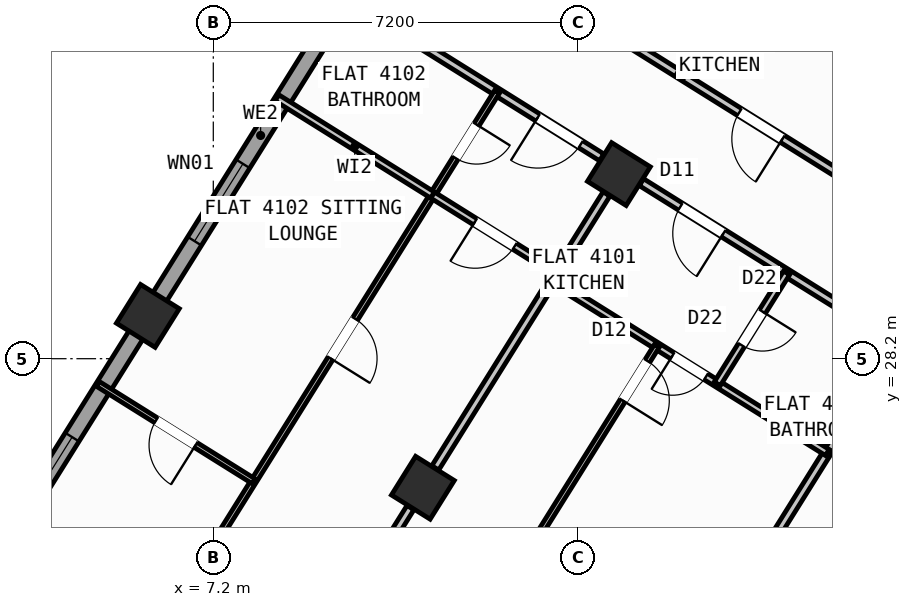
"""IFC4 building model, lengths in metres.
Left out: names, types, materials, properties, quantities, classifications, styles, units other than length and angle.
Written with IfcOpenShell. Run it as: python <this file> out.ifc"""

import sys

from ifc_helpers import new_model, si_unit, direction, frame, frame_2d, origin, origin_2d, place, context, subcontext, project, spatial, rectangle, hollow_rectangle, extrude, source, transform, mapped, element, fill, save


model = new_model("IFC4")
c1 = context("Model", 3, precision=1e-05, world=origin(), true_north=direction((0.0, 1.0)))
c2 = subcontext(c1, "Body", "Model", "MODEL_VIEW")
j1 = project(units=[si_unit("LENGTHUNIT", "METRE"), si_unit("PLANEANGLEUNIT", "RADIAN")], contexts=[c1])
p1 = place(None, origin())
s1 = spatial("IfcSite", under=j1, at=p1, CompositionType="ELEMENT")
p2 = place(p1, origin())
s2 = spatial("IfcBuilding", under=s1, at=p2, CompositionType="ELEMENT")
p3 = place(p2, frame((0.0, 0.0, 162.3)))
s3 = spatial("IfcBuildingStorey", under=s2, at=p3, CompositionType="ELEMENT", Elevation=162.3)
m1 = source(origin(), c2, "Body", "SweptSolid", [
    extrude(hollow_rectangle(XDim=0.9, YDim=0.9, WallThickness=0.036, at=origin_2d()), origin(), (0.0, 0.0, 1.0), 3.6),
])
for number, where, z_axis, x_axis in (
    (1, (15.205, 31.844, 0.0), (0.0, 0.0, 1.0), (-0.848, 0.53, 0.0)),
    (2, (11.336, 25.653, 0.0), (0.0, 0.0, 1.0), (-0.848, 0.53, 0.0)),
    (3, (5.909, 29.044, 0.0), (0.0, 0.0, 1.0), (-0.848, 0.53, 0.0)),
):
    element("IfcColumn", number, at=place(p3, frame(where, z_axis=z_axis, x_axis=x_axis)), inside=s3, PredefinedType="COLUMN", context=c2, shape_type="MappedRepresentation", body=[
        mapped(m1, transform((0.0, 0.0, 0.0), scale=1.0)),
    ])
p4 = place(p3, frame((2.415, 23.452, 0.0), z_axis=(0.0, 0.0, 1.0), x_axis=(0.52991049553, 0.848053575387, 0.0)))
e4 = element("IfcWall", 4, at=p4, inside=s3, PredefinedType="STANDARD", context=c2, shape_type="SweptSolid", body=[
    extrude(rectangle(XDim=21.587, YDim=0.32, at=frame_2d((10.794, 0.0))), origin(), (0.0, 0.0, 1.0), 2.775),
])
p5 = place(p4, frame((1.673, 0.0, 0.8)))
e5 = element("IfcOpeningElement", 5, at=p5, cuts=e4, PredefinedType="OPENING", context=c2, shape_type="SweptSolid", body=[
    extrude(rectangle(XDim=2.1, YDim=1.55, at=frame_2d((1.05, 0.775))), frame((0.0, 0.17, 0.0), z_axis=(0.0, -1.0, 0.0), x_axis=(1.0, 0.0, 0.0)), (0.0, 0.0, 1.0), 0.34),
])
p6 = place(p4, frame((8.334, 0.0, 0.85)))
e6 = element("IfcOpeningElement", 6, at=p6, cuts=e4, PredefinedType="OPENING", context=c2, shape_type="SweptSolid", body=[
    extrude(rectangle(XDim=1.8, YDim=1.5, at=frame_2d((0.9, 0.75))), frame((0.0, 0.17, 0.0), z_axis=(0.0, -1.0, 0.0), x_axis=(1.0, 0.0, 0.0)), (0.0, 0.0, 1.0), 0.34),
])
p7 = place(p4, frame((17.172, 0.0, 0.85)))
e7 = element("IfcOpeningElement", 7, at=p7, cuts=e4, PredefinedType="OPENING", context=c2, shape_type="SweptSolid", body=[
    extrude(rectangle(XDim=1.5, YDim=1.5, at=frame_2d((0.75, 0.75))), frame((0.0, 0.17, 0.0), z_axis=(0.0, -1.0, 0.0), x_axis=(1.0, 0.0, 0.0)), (0.0, 0.0, 1.0), 0.34),
])
p8 = place(p3, frame((14.138, 41.825, 0.0), z_axis=(0.0, 0.0, 1.0), x_axis=(0.848046498049, -0.529921821731, 0.0)))
e8 = element("IfcWall", 8, at=p8, inside=s3, PredefinedType="STANDARD", context=c2, shape_type="SweptSolid", body=[
    extrude(rectangle(XDim=31.588, YDim=0.32, at=frame_2d((15.794, 0.0))), origin(), (0.0, 0.0, 1.0), 3.35),
])
p9 = place(p8, frame((3.253, 0.0, 0.0)))
e9 = element("IfcOpeningElement", 9, at=p9, cuts=e8, PredefinedType="OPENING", context=c2, shape_type="SweptSolid", body=[
    extrude(rectangle(XDim=1.05, YDim=2.15, at=frame_2d((0.525, 1.075))), frame((0.0, 0.17, 0.0), z_axis=(0.0, -1.0, 0.0), x_axis=(1.0, 0.0, 0.0)), (0.0, 0.0, 1.0), 0.34),
])
p10 = place(p8, frame((0.863, 0.0, 0.85)))
e10 = element("IfcOpeningElement", 10, at=p10, cuts=e8, PredefinedType="OPENING", context=c2, shape_type="SweptSolid", body=[
    extrude(rectangle(XDim=1.8, YDim=1.5, at=frame_2d((0.9, 0.75))), frame((0.0, 0.17, 0.0), z_axis=(0.0, -1.0, 0.0), x_axis=(1.0, 0.0, 0.0)), (0.0, 0.0, 1.0), 0.34),
])
p11 = place(p8, frame((8.494, 0.0, 0.85)))
e11 = element("IfcOpeningElement", 11, at=p11, cuts=e8, PredefinedType="OPENING", context=c2, shape_type="SweptSolid", body=[
    extrude(rectangle(XDim=1.8, YDim=1.5, at=frame_2d((0.9, 0.75))), frame((0.0, 0.17, 0.0), z_axis=(0.0, -1.0, 0.0), x_axis=(1.0, 0.0, 0.0)), (0.0, 0.0, 1.0), 0.34),
])
p12 = place(p8, frame((13.874, 0.0, 0.85)))
e12 = element("IfcOpeningElement", 12, at=p12, cuts=e8, PredefinedType="OPENING", context=c2, shape_type="SweptSolid", body=[
    extrude(rectangle(XDim=1.5, YDim=1.5, at=frame_2d((0.75, 0.75))), frame((0.0, 0.17, 0.0), z_axis=(0.0, -1.0, 0.0), x_axis=(1.0, 0.0, 0.0)), (0.0, 0.0, 1.0), 0.34),
])
p13 = place(p8, frame((17.104, 0.0, 1.0)))
e13 = element("IfcOpeningElement", 13, at=p13, cuts=e8, PredefinedType="OPENING", context=c2, shape_type="SweptSolid", body=[
    extrude(rectangle(XDim=0.9, YDim=1.25, at=frame_2d((0.45, 0.625))), frame((0.0, 0.17, 0.0), z_axis=(0.0, -1.0, 0.0), x_axis=(1.0, 0.0, 0.0)), (0.0, 0.0, 1.0), 0.34),
])
p14 = place(p8, frame((22.144, 0.0, 1.0)))
e14 = element("IfcOpeningElement", 14, at=p14, cuts=e8, PredefinedType="OPENING", context=c2, shape_type="SweptSolid", body=[
    extrude(rectangle(XDim=0.9, YDim=1.25, at=frame_2d((0.45, 0.625))), frame((0.0, 0.17, 0.0), z_axis=(0.0, -1.0, 0.0), x_axis=(1.0, 0.0, 0.0)), (0.0, 0.0, 1.0), 0.34),
])
p15 = place(p8, frame((27.744, 0.0, 1.0)))
e15 = element("IfcOpeningElement", 15, at=p15, cuts=e8, PredefinedType="OPENING", context=c2, shape_type="SweptSolid", body=[
    extrude(rectangle(XDim=0.9, YDim=1.25, at=frame_2d((0.45, 0.625))), frame((0.0, 0.17, 0.0), z_axis=(0.0, -1.0, 0.0), x_axis=(1.0, 0.0, 0.0)), (0.0, 0.0, 1.0), 0.34),
])
p16 = place(p3, frame((23.899, 26.529, 0.0), z_axis=(0.0, 0.0, 1.0), x_axis=(-0.529917716469, -0.848049063305, 0.0)))
e16 = element("IfcWall", 16, at=p16, inside=s3, PredefinedType="PARTITIONING", context=c2, shape_type="SweptSolid", body=[
    extrude(rectangle(XDim=14.05, YDim=0.16, at=frame_2d((7.025, 0.0))), origin(), (0.0, 0.0, 1.0), 3.34),
])
p17 = place(p3, frame((25.065, 28.394, 0.0), z_axis=(0.0, 0.0, 1.0), x_axis=(-0.848048310262, 0.529918921593, 0.0)))
e17 = element("IfcWall", 17, at=p17, inside=s3, PredefinedType="PARTITIONING", context=c2, shape_type="SweptSolid", body=[
    extrude(rectangle(XDim=16.73, YDim=0.16, at=frame_2d((8.365, 0.0))), origin(), (0.0, 0.0, 1.0), 3.34),
])
p18 = place(p17, frame((2.22, 0.0, 0.0)))
e18 = element("IfcOpeningElement", 18, at=p18, cuts=e17, PredefinedType="OPENING", context=c2, shape_type="SweptSolid", body=[
    extrude(rectangle(XDim=0.86, YDim=2.05, at=frame_2d((0.43, 1.025))), frame((0.0, 0.09, 0.0), z_axis=(0.0, -1.0, 0.0), x_axis=(1.0, 0.0, 0.0)), (0.0, 0.0, 1.0), 0.18),
])
p19 = place(p17, frame((7.82, 0.0, 0.0)))
e19 = element("IfcOpeningElement", 19, at=p19, cuts=e17, PredefinedType="OPENING", context=c2, shape_type="SweptSolid", body=[
    extrude(rectangle(XDim=1.0, YDim=2.1, at=frame_2d((0.5, 1.05))), frame((0.0, 0.09, 0.0), z_axis=(0.0, -1.0, 0.0), x_axis=(1.0, 0.0, 0.0)), (0.0, 0.0, 1.0), 0.18),
])
p20 = place(p17, frame((12.95, 0.0, 0.0)))
e20 = element("IfcOpeningElement", 20, at=p20, cuts=e17, PredefinedType="OPENING", context=c2, shape_type="SweptSolid", body=[
    extrude(rectangle(XDim=1.0, YDim=2.1, at=frame_2d((0.5, 1.05))), frame((0.0, 0.09, 0.0), z_axis=(0.0, -1.0, 0.0), x_axis=(1.0, 0.0, 0.0)), (0.0, 0.0, 1.0), 0.18),
])
p21 = place(p3, frame((20.293, 28.782, 0.0), z_axis=(0.0, 0.0, 1.0), x_axis=(-0.848040881926, 0.529930809241, 0.0)))
e21 = element("IfcWall", 21, at=p21, inside=s3, PredefinedType="PARTITIONING", context=c2, shape_type="SweptSolid", body=[
    extrude(rectangle(XDim=5.476, YDim=0.16, at=frame_2d((2.738, 0.0))), origin(), (0.0, 0.0, 1.0), 2.775),
])
p22 = place(p21, frame((3.568, 0.0, 0.0)))
e22 = element("IfcOpeningElement", 22, at=p22, cuts=e21, PredefinedType="OPENING", context=c2, shape_type="SweptSolid", body=[
    extrude(rectangle(XDim=1.0, YDim=2.1, at=frame_2d((0.5, 1.05))), frame((0.0, 0.09, 0.0), z_axis=(0.0, -1.0, 0.0), x_axis=(1.0, 0.0, 0.0)), (0.0, 0.0, 1.0), 0.18),
])
p23 = place(p3, frame((14.866, 32.173, 0.0), z_axis=(0.0, 0.0, 1.0), x_axis=(-0.848053401719, 0.529910773464, 0.0)))
e23 = element("IfcWall", 23, at=p23, inside=s3, PredefinedType="PARTITIONING", context=c2, shape_type="SweptSolid", body=[
    extrude(rectangle(XDim=5.476, YDim=0.16, at=frame_2d((2.738, 0.0))), origin(), (0.0, 0.0, 1.0), 2.775),
])
p24 = place(p23, frame((0.488, 0.0, 0.0)))
e24 = element("IfcOpeningElement", 24, at=p24, cuts=e23, PredefinedType="OPENING", context=c2, shape_type="SweptSolid", body=[
    extrude(rectangle(XDim=1.0, YDim=2.1, at=frame_2d((0.5, 1.05))), frame((0.0, 0.09, 0.0), z_axis=(0.0, -1.0, 0.0), x_axis=(1.0, 0.0, 0.0)), (0.0, 0.0, 1.0), 0.18),
])
for number, where, z_axis, x_axis in (
    (25, (20.387, 28.06, 0.0), (0.0, 0.0, 1.0), (-0.53, -0.848, 0.0)),
    (26, (14.96, 31.452, 0.0), (0.0, 0.0, 1.0), (-0.53, -0.848, 0.0)),
):
    element("IfcWall", number, at=place(p3, frame(where, z_axis=z_axis, x_axis=x_axis)), inside=s3, PredefinedType="PARTITIONING", context=c2, shape_type="SweptSolid", body=[
        extrude(rectangle(XDim=6.376, YDim=0.16, at=frame_2d((3.188, 0.0))), origin(), (0.0, 0.0, 1.0), 2.775),
    ])
p25 = place(p3, frame((11.091, 25.261, 0.0), z_axis=(0.0, 0.0, 1.0), x_axis=(-0.52994257524, -0.848033529377, 0.0)))
e27 = element("IfcWall", 27, at=p25, inside=s3, PredefinedType="PARTITIONING", context=c2, shape_type="SweptSolid", body=[
    extrude(rectangle(XDim=5.451, YDim=0.16, at=frame_2d((2.726, 0.0))), origin(), (0.0, 0.0, 1.0), 2.775),
])
p26 = place(p3, frame((19.318, 26.349, 0.0), z_axis=(0.0, 0.0, 1.0), x_axis=(-0.848039019877, 0.529933789039, 0.0)))
e28 = element("IfcWall", 28, at=p26, inside=s3, PredefinedType="PLUMBINGWALL", context=c2, shape_type="SweptSolid", body=[
    extrude(rectangle(XDim=6.4, YDim=0.14, at=frame_2d((3.2, 0.0))), origin(), (0.0, 0.0, 1.0), 3.34),
])
p27 = place(p26, frame((2.824, 0.0, 0.0)))
e29 = element("IfcOpeningElement", 29, at=p27, cuts=e28, PredefinedType="OPENING", context=c2, shape_type="SweptSolid", body=[
    extrude(rectangle(XDim=0.78, YDim=2.05, at=frame_2d((0.39, 1.025))), frame((0.0, 0.08, 0.0), z_axis=(0.0, -1.0, 0.0), x_axis=(1.0, 0.0, 0.0)), (0.0, 0.0, 1.0), 0.16),
])
p28 = place(p3, frame((18.514, 29.894, 0.0), z_axis=(0.0, 0.0, 1.0), x_axis=(-0.529913878929, -0.848051461244, 0.0)))
e30 = element("IfcWall", 30, at=p28, inside=s3, PredefinedType="PLUMBINGWALL", context=c2, shape_type="SweptSolid", body=[
    extrude(rectangle(XDim=2.58, YDim=0.14, at=frame_2d((1.29, 0.0))), origin(), (0.0, 0.0, 1.0), 3.34),
])
p29 = place(p28, frame((0.9, 0.0, 0.0)))
e31 = element("IfcOpeningElement", 31, at=p29, cuts=e30, PredefinedType="OPENING", context=c2, shape_type="SweptSolid", body=[
    extrude(rectangle(XDim=0.78, YDim=2.05, at=frame_2d((0.39, 1.025))), frame((0.0, 0.08, 0.0), z_axis=(0.0, -1.0, 0.0), x_axis=(1.0, 0.0, 0.0)), (0.0, 0.0, 1.0), 0.16),
])
p30 = place(p3, frame((15.953, 28.452, 0.0), z_axis=(0.0, 0.0, 1.0), x_axis=(-0.529931645041, -0.848040359643, 0.0)))
e32 = element("IfcWall", 32, at=p30, inside=s3, PredefinedType="PARTITIONING", context=c2, shape_type="SweptSolid", body=[
    extrude(rectangle(XDim=11.74, YDim=0.11, at=frame_2d((5.87, 0.0))), origin(), (0.0, 0.0, 1.0), 3.34),
])
p31 = place(p30, frame((0.35, 0.0, 0.0)))
e33 = element("IfcOpeningElement", 33, at=p31, cuts=e32, PredefinedType="OPENING", context=c2, shape_type="SweptSolid", body=[
    extrude(rectangle(XDim=0.92, YDim=2.08, at=frame_2d((0.46, 1.04))), frame((0.0, 0.065, 0.0), z_axis=(0.0, -1.0, 0.0), x_axis=(1.0, 0.0, 0.0)), (0.0, 0.0, 1.0), 0.13),
])
p32 = place(p3, frame((12.798, 33.465, 0.0), z_axis=(0.0, 0.0, 1.0), x_axis=(-0.529916182913, -0.848050021571, 0.0)))
e34 = element("IfcWall", 34, at=p32, inside=s3, PredefinedType="PARTITIONING", context=c2, shape_type="SweptSolid", body=[
    extrude(rectangle(XDim=14.32, YDim=0.11, at=frame_2d((7.16, 0.0))), origin(), (0.0, 0.0, 1.0), 3.34),
])
p33 = place(p32, frame((0.76, 0.0, 0.0)))
e35 = element("IfcOpeningElement", 35, at=p33, cuts=e34, PredefinedType="OPENING", context=c2, shape_type="SweptSolid", body=[
    extrude(rectangle(XDim=0.78, YDim=2.05, at=frame_2d((0.39, 1.025))), frame((0.0, 0.065, 0.0), z_axis=(0.0, -1.0, 0.0), x_axis=(1.0, 0.0, 0.0)), (0.0, 0.0, 1.0), 0.13),
])
p34 = place(p32, frame((5.281, 0.0, 0.0)))
e36 = element("IfcOpeningElement", 36, at=p34, cuts=e34, PredefinedType="OPENING", context=c2, shape_type="SweptSolid", body=[
    extrude(rectangle(XDim=0.92, YDim=2.08, at=frame_2d((0.46, 1.04))), frame((0.0, 0.065, 0.0), z_axis=(0.0, -1.0, 0.0), x_axis=(1.0, 0.0, 0.0)), (0.0, 0.0, 1.0), 0.13),
])
p35 = place(p3, frame((13.986, 29.893, 0.0), z_axis=(0.0, 0.0, 1.0), x_axis=(-0.84802195137, 0.529961102341, 0.0)))
e37 = element("IfcWall", 37, at=p35, inside=s3, PredefinedType="PLUMBINGWALL", context=c2, shape_type="SweptSolid", body=[
    extrude(rectangle(XDim=2.9, YDim=0.14, at=frame_2d((1.45, 0.0))), origin(), (0.0, 0.0, 1.0), 3.34),
])
p36 = place(p35, frame((0.99, 0.0, 0.0)))
e38 = element("IfcOpeningElement", 38, at=p36, cuts=e37, PredefinedType="OPENING", context=c2, shape_type="SweptSolid", body=[
    extrude(rectangle(XDim=0.92, YDim=2.08, at=frame_2d((0.46, 1.04))), frame((0.0, 0.08, 0.0), z_axis=(0.0, -1.0, 0.0), x_axis=(1.0, 0.0, 0.0)), (0.0, 0.0, 1.0), 0.16),
])
p37 = place(p3, frame((11.526, 31.43, 0.0), z_axis=(0.0, 0.0, 1.0), x_axis=(-0.848051346257, 0.52991406295, 0.0)))
e39 = element("IfcWall", 39, at=p37, inside=s3, PredefinedType="PLUMBINGWALL", context=c2, shape_type="SweptSolid", body=[
    extrude(rectangle(XDim=3.62, YDim=0.14, at=frame_2d((1.81, 0.0))), origin(), (0.0, 0.0, 1.0), 3.34),
])
p38 = place(p3, frame((7.997, 25.781, 0.0), z_axis=(0.0, 0.0, 1.0), x_axis=(-0.848051346257, 0.52991406295, 0.0)))
e40 = element("IfcWall", 40, at=p38, inside=s3, PredefinedType="PARTITIONING", context=c2, shape_type="SweptSolid", body=[
    extrude(rectangle(XDim=3.62, YDim=0.11, at=frame_2d((1.81, 0.0))), origin(), (0.0, 0.0, 1.0), 3.34),
])
p39 = place(p38, frame((1.35, 0.0, 0.0)))
e41 = element("IfcOpeningElement", 41, at=p39, cuts=e40, PredefinedType="OPENING", context=c2, shape_type="SweptSolid", body=[
    extrude(rectangle(XDim=0.92, YDim=2.08, at=frame_2d((0.46, 1.04))), frame((0.0, 0.065, 0.0), z_axis=(0.0, -1.0, 0.0), x_axis=(1.0, 0.0, 0.0)), (0.0, 0.0, 1.0), 0.13),
])
p40 = place(p3, frame((18.828, 37.643, 0.0), z_axis=(0.0, 0.0, 1.0), x_axis=(-0.529926399231, -0.848043637673, 0.0)))
e42 = element("IfcWall", 42, at=p40, inside=s3, PredefinedType="PARTITIONING", context=c2, shape_type="SweptSolid", body=[
    extrude(rectangle(XDim=4.538, YDim=0.16, at=frame_2d((2.269, 0.0))), origin(), (0.0, 0.0, 1.0), 2.775),
])
p41 = place(p3, frame((23.218, 32.591, 0.0), z_axis=(0.0, 0.0, 1.0), x_axis=(-0.848056163074, 0.529906354247, 0.0)))
e43 = element("IfcWall", 43, at=p41, inside=s3, PredefinedType="PLUMBINGWALL", context=c2, shape_type="SweptSolid", body=[
    extrude(rectangle(XDim=6.4, YDim=0.14, at=frame_2d((3.2, 0.0))), origin(), (0.0, 0.0, 1.0), 3.34),
])
p42 = place(p41, frame((4.04, 0.0, 0.0)))
e44 = element("IfcOpeningElement", 44, at=p42, cuts=e43, PredefinedType="OPENING", context=c2, shape_type="SweptSolid", body=[
    extrude(rectangle(XDim=0.92, YDim=2.08, at=frame_2d((0.46, 1.04))), frame((0.0, 0.08, 0.0), z_axis=(0.0, -1.0, 0.0), x_axis=(1.0, 0.0, 0.0)), (0.0, 0.0, 1.0), 0.16),
])
m2 = source(origin(), c2, "Body", "SweptSolid", [
    extrude(rectangle(XDim=2.1, YDim=1.55, at=frame_2d((1.05, 0.775))), frame((0.0, 0.03, 0.0), z_axis=(0.0, -1.0, 0.0), x_axis=(1.0, 0.0, 0.0)), (0.0, 0.0, 1.0), 0.06),
])
p43 = place(p5, origin())
e45 = element("IfcWindow", 45, at=p43, inside=s3, PartitioningType="SINGLE_PANEL", PredefinedType="WINDOW", context=c2, shape_type="MappedRepresentation", body=[
    mapped(m2, transform((0.0, 0.0, 0.0), scale=1.0)),
])
fill(e5, e45)
m3 = source(origin(), c2, "Body", "SweptSolid", [
    extrude(rectangle(XDim=1.8, YDim=1.5, at=frame_2d((0.9, 0.75))), frame((0.0, 0.03, 0.0), z_axis=(0.0, -1.0, 0.0), x_axis=(1.0, 0.0, 0.0)), (0.0, 0.0, 1.0), 0.06),
])
p44 = place(p6, origin())
e46 = element("IfcWindow", 46, at=p44, inside=s3, PartitioningType="SINGLE_PANEL", PredefinedType="WINDOW", context=c2, shape_type="MappedRepresentation", body=[
    mapped(m3, transform((0.0, 0.0, 0.0), scale=1.0)),
])
fill(e6, e46)
m4 = source(origin(), c2, "Body", "SweptSolid", [
    extrude(rectangle(XDim=0.92, YDim=2.08, at=frame_2d((0.46, 1.04))), frame((0.0, 0.025, 0.0), z_axis=(0.0, -1.0, 0.0), x_axis=(1.0, 0.0, 0.0)), (0.0, 0.0, 1.0), 0.05),
])
p45 = place(p31, origin())
e47 = element("IfcDoor", 47, at=p45, inside=s3, OperationType="SINGLE_SWING_RIGHT", PredefinedType="DOOR", context=c2, shape_type="MappedRepresentation", body=[
    mapped(m4, transform((0.0, 0.0, 0.0), scale=1.0)),
])
fill(e33, e47)
m5 = source(origin(), c2, "Body", "SweptSolid", [
    extrude(rectangle(XDim=1.0, YDim=2.1, at=frame_2d((0.5, 1.05))), frame((0.0, 0.025, 0.0), z_axis=(0.0, -1.0, 0.0), x_axis=(1.0, 0.0, 0.0)), (0.0, 0.0, 1.0), 0.05),
])
p46 = place(p22, origin())
e48 = element("IfcDoor", 48, at=p46, inside=s3, OperationType="SINGLE_SWING_LEFT", PredefinedType="DOOR", context=c2, shape_type="MappedRepresentation", body=[
    mapped(m5, transform((0.0, 0.0, 0.0), scale=1.0)),
])
fill(e22, e48)
m6 = source(origin(), c2, "Body", "SweptSolid", [
    extrude(rectangle(XDim=0.78, YDim=2.05, at=frame_2d((0.39, 1.025))), frame((0.0, 0.025, 0.0), z_axis=(0.0, -1.0, 0.0), x_axis=(1.0, 0.0, 0.0)), (0.0, 0.0, 1.0), 0.05),
])
p47 = place(p27, origin())
e49 = element("IfcDoor", 49, at=p47, inside=s3, OperationType="SINGLE_SWING_RIGHT", PredefinedType="DOOR", context=c2, shape_type="MappedRepresentation", body=[
    mapped(m6, transform((0.0, 0.0, 0.0), scale=1.0)),
])
fill(e29, e49)
p48 = place(p29, origin())
e50 = element("IfcDoor", 50, at=p48, inside=s3, OperationType="SINGLE_SWING_LEFT", PredefinedType="DOOR", context=c2, shape_type="MappedRepresentation", body=[
    mapped(m6, transform((0.0, 0.0, 0.0), scale=1.0)),
])
fill(e31, e50)
p49 = place(p24, origin())
e51 = element("IfcDoor", 51, at=p49, inside=s3, OperationType="SINGLE_SWING_RIGHT", PredefinedType="DOOR", context=c2, shape_type="MappedRepresentation", body=[
    mapped(m5, transform((0.0, 0.0, 0.0), scale=1.0)),
])
fill(e24, e51)
p50 = place(p36, origin())
e52 = element("IfcDoor", 52, at=p50, inside=s3, OperationType="SINGLE_SWING_RIGHT", PredefinedType="DOOR", context=c2, shape_type="MappedRepresentation", body=[
    mapped(m4, transform((0.0, 0.0, 0.0), scale=1.0)),
])
fill(e38, e52)
p51 = place(p33, origin())
e53 = element("IfcDoor", 53, at=p51, inside=s3, OperationType="SINGLE_SWING_LEFT", PredefinedType="DOOR", context=c2, shape_type="MappedRepresentation", body=[
    mapped(m6, transform((0.0, 0.0, 0.0), scale=1.0)),
])
fill(e35, e53)
p52 = place(p34, origin())
e54 = element("IfcDoor", 54, at=p52, inside=s3, OperationType="SINGLE_SWING_RIGHT", PredefinedType="DOOR", context=c2, shape_type="MappedRepresentation", body=[
    mapped(m4, transform((0.0, 0.0, 0.0), scale=1.0)),
])
fill(e36, e54)
p53 = place(p39, origin())
e55 = element("IfcDoor", 55, at=p53, inside=s3, OperationType="SINGLE_SWING_LEFT", PredefinedType="DOOR", context=c2, shape_type="MappedRepresentation", body=[
    mapped(m4, transform((0.0, 0.0, 0.0), scale=1.0)),
])
fill(e41, e55)
p54 = place(p19, origin())
e56 = element("IfcDoor", 56, at=p54, inside=s3, OperationType="SINGLE_SWING_LEFT", PredefinedType="DOOR", context=c2, shape_type="MappedRepresentation", body=[
    mapped(m5, transform((0.0, 0.0, 0.0), scale=1.0)),
])
fill(e19, e56)
save(model, sys.argv[1])
